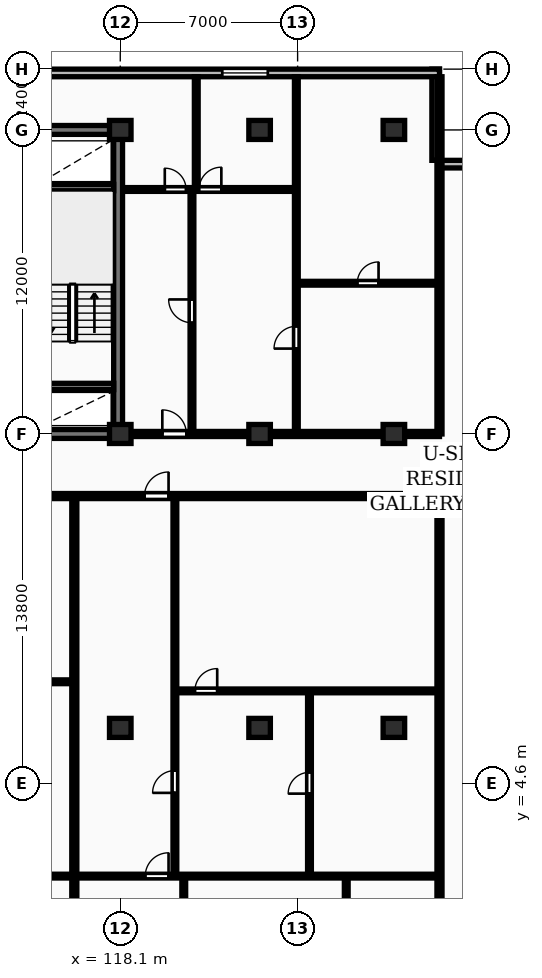
"""IFC4 building model, lengths in metres.
Left out: names, types, materials, properties, quantities, classifications, styles, units other than length and angle.
Written with IfcOpenShell. Run it as: python <this file> out.ifc"""

import sys

from ifc_helpers import new_model, si_unit, direction, frame, frame_2d, origin, origin_2d, place, context, subcontext, project, spatial, rectangle, extrude, element, fill, save


model = new_model("IFC4")
c1 = context("Model", 3, precision=1e-05, world=origin(), true_north=direction((0.0, 1.0)))
c2 = subcontext(c1, "Body", "Model", "MODEL_VIEW")
j1 = project(units=[si_unit("LENGTHUNIT", "METRE"), si_unit("PLANEANGLEUNIT", "RADIAN")], contexts=[c1])
p1 = place(None, origin())
s1 = spatial("IfcSite", under=j1, at=p1, CompositionType="ELEMENT")
p2 = place(p1, origin())
s2 = spatial("IfcBuilding", under=s1, at=p2, CompositionType="ELEMENT")
p3 = place(p2, frame((0.0, 0.0, 132.8)))
s3 = spatial("IfcBuildingStorey", under=s2, at=p3, CompositionType="ELEMENT", Elevation=132.8)
for number, where, z_axis, x_axis in (
    (1, (118.1, 6.8, 0.0), (0.0, 0.0, 1.0), (1.0, 0.0, 0.0)),
    (2, (118.1, 18.4, 0.0), (0.0, 0.0, 1.0), (1.0, 0.0, 0.0)),
    (3, (118.1, 30.4, 0.0), (0.0, 0.0, 1.0), (1.0, 0.0, 0.0)),
    (4, (123.6, 6.8, 0.0), (0.0, 0.0, 1.0), (1.0, 0.0, 0.0)),
    (5, (123.6, 18.4, 0.0), (0.0, 0.0, 1.0), (1.0, 0.0, 0.0)),
    (6, (123.6, 30.4, 0.0), (0.0, 0.0, 1.0), (1.0, 0.0, 0.0)),
    (7, (128.9, 6.8, 0.0), (0.0, 0.0, 1.0), (1.0, 0.0, 0.0)),
    (8, (128.9, 18.4, 0.0), (0.0, 0.0, 1.0), (1.0, 0.0, 0.0)),
    (9, (128.9, 30.4, 0.0), (0.0, 0.0, 1.0), (1.0, 0.0, 0.0)),
):
    element("IfcColumn", number, at=place(p3, frame(where, z_axis=z_axis, x_axis=x_axis)), inside=s3, PredefinedType="COLUMN", context=c2, shape_type="SweptSolid", body=[
        extrude(rectangle(XDim=0.85, YDim=0.75, at=origin_2d()), origin(), (0.0, 0.0, 1.0), 3.25),
    ])
for number, where, z_axis, x_axis in (
    (10, (134.3, 29.05, 0.0), (0.0, 0.0, 1.0), (-1.0, 0.0, 0.0)),
    (11, (130.55, 29.2, 0.0), (0.0, 0.0, 1.0), (0.0, 1.0, 0.0)),
):
    element("IfcWall", number, at=place(p3, frame(where, z_axis=z_axis, x_axis=x_axis)), inside=s3, PredefinedType="STANDARD", context=c2, shape_type="SweptSolid", body=[
        extrude(rectangle(XDim=3.6, YDim=0.3, at=frame_2d((1.8, 0.0))), origin(), (0.0, 0.0, 1.0), 2.97),
    ])
p4 = place(p3, frame((130.7, 32.65, 0.0), z_axis=(0.0, 0.0, 1.0), x_axis=(-1.0, 0.0, 0.0)))
e12 = element("IfcWall", 12, at=p4, inside=s3, PredefinedType="STANDARD", context=c2, shape_type="SweptSolid", body=[
    extrude(rectangle(XDim=58.0, YDim=0.3, at=frame_2d((29.0, 0.0))), origin(), (0.0, 0.0, 1.0), 2.97),
])
p5 = place(p4, frame((50.125, 0.0, 0.85)))
e13 = element("IfcOpeningElement", 13, at=p5, cuts=e12, PredefinedType="OPENING", context=c2, shape_type="SweptSolid", body=[
    extrude(rectangle(XDim=1.8, YDim=1.8, at=frame_2d((0.9, 0.9))), frame((0.0, 0.16, 0.0), z_axis=(0.0, -1.0, 0.0), x_axis=(1.0, 0.0, 0.0)), (0.0, 0.0, 1.0), 0.32),
])
p6 = place(p4, frame((6.775, 0.0, 0.85)))
e14 = element("IfcOpeningElement", 14, at=p6, cuts=e12, PredefinedType="OPENING", context=c2, shape_type="SweptSolid", body=[
    extrude(rectangle(XDim=1.8, YDim=1.8, at=frame_2d((0.9, 0.9))), frame((0.0, 0.16, 0.0), z_axis=(0.0, -1.0, 0.0), x_axis=(1.0, 0.0, 0.0)), (0.0, 0.0, 1.0), 0.32),
])
p7 = place(p3, frame((81.925, 30.4, 0.0), z_axis=(0.0, 0.0, 1.0), x_axis=(1.0, 0.0, 0.0)))
e15 = element("IfcWall", 15, at=p7, inside=s3, PredefinedType="SHEAR", context=c2, shape_type="SweptSolid", body=[
    extrude(rectangle(XDim=36.265, YDim=0.35, at=frame_2d((18.132, 0.0))), origin(), (0.0, 0.0, 1.0), 3.25),
])
p8 = place(p3, frame((118.015, 18.575, 0.0), z_axis=(0.0, 0.0, 1.0), x_axis=(0.0, 1.0, 0.0)))
e16 = element("IfcWall", 16, at=p8, inside=s3, PredefinedType="SHEAR", context=c2, shape_type="SweptSolid", body=[
    extrude(rectangle(XDim=11.65, YDim=0.35, at=frame_2d((5.825, 0.0))), origin(), (0.0, 0.0, 1.0), 3.25),
])
p9 = place(p3, frame((81.925, 18.4, 0.0), z_axis=(0.0, 0.0, 1.0), x_axis=(1.0, 0.0, 0.0)))
e17 = element("IfcWall", 17, at=p9, inside=s3, PredefinedType="SHEAR", context=c2, shape_type="SweptSolid", body=[
    extrude(rectangle(XDim=36.265, YDim=0.35, at=frame_2d((18.132, 0.0))), origin(), (0.0, 0.0, 1.0), 3.25),
])
p10 = place(p9, frame((5.675, 0.0, 0.0)))
e18 = element("IfcOpeningElement", 18, at=p10, cuts=e17, PredefinedType="OPENING", context=c2, shape_type="SweptSolid", body=[
    extrude(rectangle(XDim=1.0, YDim=2.15, at=frame_2d((0.5, 1.075))), frame((0.0, 0.185, 0.0), z_axis=(0.0, -1.0, 0.0), x_axis=(1.0, 0.0, 0.0)), (0.0, 0.0, 1.0), 0.37),
])
p11 = place(p9, frame((21.925, 0.0, 0.0)))
e19 = element("IfcOpeningElement", 19, at=p11, cuts=e17, PredefinedType="OPENING", context=c2, shape_type="SweptSolid", body=[
    extrude(rectangle(XDim=1.5, YDim=2.2, at=frame_2d((0.75, 1.1))), frame((0.0, 0.185, 0.0), z_axis=(0.0, -1.0, 0.0), x_axis=(1.0, 0.0, 0.0)), (0.0, 0.0, 1.0), 0.37),
])
p12 = place(p9, frame((29.875, 0.0, 0.0)))
e20 = element("IfcOpeningElement", 20, at=p12, cuts=e17, PredefinedType="OPENING", context=c2, shape_type="SweptSolid", body=[
    extrude(rectangle(XDim=1.0, YDim=2.15, at=frame_2d((0.5, 1.075))), frame((0.0, 0.185, 0.0), z_axis=(0.0, -1.0, 0.0), x_axis=(1.0, 0.0, 0.0)), (0.0, 0.0, 1.0), 0.37),
])
for number, where, z_axis, x_axis in (
    (21, (114.6, 20.275, 0.0), (0.0, 0.0, 1.0), (1.0, 0.0, 0.0)),
    (22, (114.6, 28.125, 0.0), (0.0, 0.0, 1.0), (1.0, 0.0, 0.0)),
):
    element("IfcWall", number, at=place(p3, frame(where, z_axis=z_axis, x_axis=x_axis)), inside=s3, PredefinedType="SHEAR", context=c2, shape_type="SweptSolid", body=[
        extrude(rectangle(XDim=3.24, YDim=0.25, at=frame_2d((1.62, 0.0))), origin(), (0.0, 0.0, 1.0), 3.25),
    ])
p13 = place(p3, frame((130.7, 18.4, 0.0), z_axis=(0.0, 0.0, 1.0), x_axis=(0.0, 1.0, 0.0)))
e23 = element("IfcWall", 23, at=p13, inside=s3, PredefinedType="PARTITIONING", context=c2, shape_type="SweptSolid", body=[
    extrude(rectangle(XDim=14.1, YDim=0.2, at=frame_2d((7.05, 0.0))), origin(), (0.0, 0.0, 1.0), 2.97),
])
p14 = place(p3, frame((125.05, 24.35, 0.0), z_axis=(0.0, 0.0, 1.0), x_axis=(1.0, 0.0, 0.0)))
e24 = element("IfcWall", 24, at=p14, inside=s3, PredefinedType="PARTITIONING", context=c2, shape_type="SweptSolid", body=[
    extrude(rectangle(XDim=5.65, YDim=0.15, at=frame_2d((2.825, 0.0))), origin(), (0.0, 0.0, 1.0), 2.97),
])
p15 = place(p14, frame((2.405, 0.0, 0.0)))
e25 = element("IfcOpeningElement", 25, at=p15, cuts=e24, PredefinedType="OPENING", context=c2, shape_type="SweptSolid", body=[
    extrude(rectangle(XDim=0.84, YDim=2.04, at=frame_2d((0.42, 1.02))), frame((0.0, 0.085, 0.0), z_axis=(0.0, -1.0, 0.0), x_axis=(1.0, 0.0, 0.0)), (0.0, 0.0, 1.0), 0.17),
])
p16 = place(p3, frame((125.05, 18.45, 0.0), z_axis=(0.0, 0.0, 1.0), x_axis=(0.0, 1.0, 0.0)))
e26 = element("IfcWall", 26, at=p16, inside=s3, PredefinedType="PARTITIONING", context=c2, shape_type="SweptSolid", body=[
    extrude(rectangle(XDim=14.05, YDim=0.15, at=frame_2d((7.025, 0.0))), origin(), (0.0, 0.0, 1.0), 2.97),
])
p17 = place(p16, frame((3.32, 0.0, 0.0)))
e27 = element("IfcOpeningElement", 27, at=p17, cuts=e26, PredefinedType="OPENING", context=c2, shape_type="SweptSolid", body=[
    extrude(rectangle(XDim=0.88, YDim=2.06, at=frame_2d((0.44, 1.03))), frame((0.0, 0.085, 0.0), z_axis=(0.0, -1.0, 0.0), x_axis=(1.0, 0.0, 0.0)), (0.0, 0.0, 1.0), 0.17),
])
p18 = place(p3, frame((120.93, 18.45, 0.0), z_axis=(0.0, 0.0, 1.0), x_axis=(0.0, 1.0, 0.0)))
e28 = element("IfcWall", 28, at=p18, inside=s3, PredefinedType="PARTITIONING", context=c2, shape_type="SweptSolid", body=[
    extrude(rectangle(XDim=9.6, YDim=0.15, at=frame_2d((4.8, 0.0))), origin(), (0.0, 0.0, 1.0), 2.97),
])
p19 = place(p18, frame((4.34, 0.0, 0.0)))
e29 = element("IfcOpeningElement", 29, at=p19, cuts=e28, PredefinedType="OPENING", context=c2, shape_type="SweptSolid", body=[
    extrude(rectangle(XDim=0.92, YDim=2.08, at=frame_2d((0.46, 1.04))), frame((0.0, 0.085, 0.0), z_axis=(0.0, -1.0, 0.0), x_axis=(1.0, 0.0, 0.0)), (0.0, 0.0, 1.0), 0.17),
])
p20 = place(p3, frame((121.1, 28.05, 0.0), z_axis=(0.0, 0.0, 1.0), x_axis=(0.0, 1.0, 0.0)))
e30 = element("IfcWall", 30, at=p20, inside=s3, PredefinedType="PARTITIONING", context=c2, shape_type="SweptSolid", body=[
    extrude(rectangle(XDim=4.45, YDim=0.15, at=frame_2d((2.225, 0.0))), origin(), (0.0, 0.0, 1.0), 2.97),
])
p21 = place(p3, frame((118.27, 28.05, 0.0), z_axis=(0.0, 0.0, 1.0), x_axis=(1.0, 0.0, 0.0)))
e31 = element("IfcWall", 31, at=p21, inside=s3, PredefinedType="PARTITIONING", context=c2, shape_type="SweptSolid", body=[
    extrude(rectangle(XDim=6.76, YDim=0.15, at=frame_2d((3.38, 0.0))), origin(), (0.0, 0.0, 1.0), 2.97),
])
p22 = place(p21, frame((1.587, 0.0, 0.0)))
e32 = element("IfcOpeningElement", 32, at=p22, cuts=e31, PredefinedType="OPENING", context=c2, shape_type="SweptSolid", body=[
    extrude(rectangle(XDim=0.84, YDim=2.04, at=frame_2d((0.42, 1.02))), frame((0.0, 0.085, 0.0), z_axis=(0.0, -1.0, 0.0), x_axis=(1.0, 0.0, 0.0)), (0.0, 0.0, 1.0), 0.17),
])
p23 = place(p21, frame((2.94, 0.0, 0.0)))
e33 = element("IfcOpeningElement", 33, at=p23, cuts=e31, PredefinedType="OPENING", context=c2, shape_type="SweptSolid", body=[
    extrude(rectangle(XDim=0.88, YDim=2.06, at=frame_2d((0.44, 1.03))), frame((0.0, 0.085, 0.0), z_axis=(0.0, -1.0, 0.0), x_axis=(1.0, 0.0, 0.0)), (0.0, 0.0, 1.0), 0.17),
])
p24 = place(p3, frame((118.25, 18.4, 0.0), z_axis=(0.0, 0.0, 1.0), x_axis=(1.0, 0.0, 0.0)))
e34 = element("IfcWall", 34, at=p24, inside=s3, PredefinedType="PARTITIONING", context=c2, shape_type="SweptSolid", body=[
    extrude(rectangle(XDim=12.45, YDim=0.2, at=frame_2d((6.225, 0.0))), origin(), (0.0, 0.0, 1.0), 2.358),
])
p25 = place(p24, frame((1.51, 0.0, 0.0)))
e35 = element("IfcOpeningElement", 35, at=p25, cuts=e34, PredefinedType="OPENING", context=c2, shape_type="SweptSolid", body=[
    extrude(rectangle(XDim=0.95, YDim=2.15, at=frame_2d((0.475, 1.075))), frame((0.0, 0.11, 0.0), z_axis=(0.0, -1.0, 0.0), x_axis=(1.0, 0.0, 0.0)), (0.0, 0.0, 1.0), 0.22),
])
for number, where, z_axis, x_axis in (
    (36, (130.7, -8.7, 0.0), (0.0, 0.0, 1.0), (0.0, 1.0, 0.0)),
    (37, (116.286, -8.7, 0.0), (0.0, 0.0, 1.0), (0.0, 1.0, 0.0)),
):
    element("IfcWall", number, at=place(p3, frame(where, z_axis=z_axis, x_axis=x_axis)), inside=s3, PredefinedType="PARTITIONING", context=c2, shape_type="SweptSolid", body=[
        extrude(rectangle(XDim=24.57, YDim=0.2, at=frame_2d((12.285, 0.0))), origin(), (0.0, 0.0, 1.0), 2.97),
    ])
p26 = place(p3, frame((101.685, 8.62, 0.0), z_axis=(0.0, 0.0, 1.0), x_axis=(1.0, 0.0, 0.0)))
e38 = element("IfcWall", 38, at=p26, inside=s3, PredefinedType="PARTITIONING", context=c2, shape_type="SweptSolid", body=[
    extrude(rectangle(XDim=14.522, YDim=0.15, at=frame_2d((7.261, 0.0))), origin(), (0.0, 0.0, 1.0), 2.97),
])
p27 = place(p26, frame((4.903, 0.0, 0.0)))
e39 = element("IfcOpeningElement", 39, at=p27, cuts=e38, PredefinedType="OPENING", context=c2, shape_type="SweptSolid", body=[
    extrude(rectangle(XDim=0.88, YDim=2.06, at=frame_2d((0.44, 1.03))), frame((0.0, 0.085, 0.0), z_axis=(0.0, -1.0, 0.0), x_axis=(1.0, 0.0, 0.0)), (0.0, 0.0, 1.0), 0.17),
])
p28 = place(p3, frame((97.735, 0.95, 0.0), z_axis=(0.0, 0.0, 1.0), x_axis=(1.0, 0.0, 0.0)))
e40 = element("IfcWall", 40, at=p28, inside=s3, PredefinedType="PARTITIONING", context=c2, shape_type="SweptSolid", body=[
    extrude(rectangle(XDim=18.472, YDim=0.15, at=frame_2d((9.236, 0.0))), origin(), (0.0, 0.0, 1.0), 2.97),
])
p29 = place(p28, frame((2.72, 0.0, 0.0)))
e41 = element("IfcOpeningElement", 41, at=p29, cuts=e40, PredefinedType="OPENING", context=c2, shape_type="SweptSolid", body=[
    extrude(rectangle(XDim=0.92, YDim=2.08, at=frame_2d((0.46, 1.04))), frame((0.0, 0.085, 0.0), z_axis=(0.0, -1.0, 0.0), x_axis=(1.0, 0.0, 0.0)), (0.0, 0.0, 1.0), 0.17),
])
p30 = place(p3, frame((125.568, 0.99, 0.0), z_axis=(0.0, 0.0, 1.0), x_axis=(0.0, 1.0, 0.0)))
e42 = element("IfcWall", 42, at=p30, inside=s3, PredefinedType="PARTITIONING", context=c2, shape_type="SweptSolid", body=[
    extrude(rectangle(XDim=7.27, YDim=0.15, at=frame_2d((3.635, 0.0))), origin(), (0.0, 0.0, 1.0), 2.97),
])
p31 = place(p30, frame((3.215, 0.0, 0.0)))
e43 = element("IfcOpeningElement", 43, at=p31, cuts=e42, PredefinedType="OPENING", context=c2, shape_type="SweptSolid", body=[
    extrude(rectangle(XDim=0.84, YDim=2.04, at=frame_2d((0.42, 1.02))), frame((0.0, 0.085, 0.0), z_axis=(0.0, -1.0, 0.0), x_axis=(1.0, 0.0, 0.0)), (0.0, 0.0, 1.0), 0.17),
])
p32 = place(p3, frame((120.316, 8.26, 0.0), z_axis=(0.0, 0.0, 1.0), x_axis=(1.0, 0.0, 0.0)))
e44 = element("IfcWall", 44, at=p32, inside=s3, PredefinedType="PARTITIONING", context=c2, shape_type="SweptSolid", body=[
    extrude(rectangle(XDim=10.304, YDim=0.15, at=frame_2d((5.152, 0.0))), origin(), (0.0, 0.0, 1.0), 2.97),
])
p33 = place(p32, frame((0.73, 0.0, 0.0)))
e45 = element("IfcOpeningElement", 45, at=p33, cuts=e44, PredefinedType="OPENING", context=c2, shape_type="SweptSolid", body=[
    extrude(rectangle(XDim=0.88, YDim=2.06, at=frame_2d((0.44, 1.03))), frame((0.0, 0.085, 0.0), z_axis=(0.0, -1.0, 0.0), x_axis=(1.0, 0.0, 0.0)), (0.0, 0.0, 1.0), 0.17),
])
p34 = place(p3, frame((120.256, 0.99, 0.0), z_axis=(0.0, 0.0, 1.0), x_axis=(0.0, 1.0, 0.0)))
e46 = element("IfcWall", 46, at=p34, inside=s3, PredefinedType="PARTITIONING", context=c2, shape_type="SweptSolid", body=[
    extrude(rectangle(XDim=14.9, YDim=0.15, at=frame_2d((7.45, 0.0))), origin(), (0.0, 0.0, 1.0), 2.97),
])
p35 = place(p34, frame((3.245, 0.0, 0.0)))
e47 = element("IfcOpeningElement", 47, at=p35, cuts=e46, PredefinedType="OPENING", context=c2, shape_type="SweptSolid", body=[
    extrude(rectangle(XDim=0.88, YDim=2.06, at=frame_2d((0.44, 1.03))), frame((0.0, 0.085, 0.0), z_axis=(0.0, -1.0, 0.0), x_axis=(1.0, 0.0, 0.0)), (0.0, 0.0, 1.0), 0.17),
])
p36 = place(p3, frame((120.606, -4.09, 0.0), z_axis=(0.0, 0.0, 1.0), x_axis=(0.0, 1.0, 0.0)))
e48 = element("IfcWall", 48, at=p36, inside=s3, PredefinedType="PARTITIONING", context=c2, shape_type="SweptSolid", body=[
    extrude(rectangle(XDim=5.0, YDim=0.15, at=frame_2d((2.5, 0.0))), origin(), (0.0, 0.0, 1.0), 2.97),
])
p37 = place(p36, frame((2.06, 0.0, 0.0)))
e49 = element("IfcOpeningElement", 49, at=p37, cuts=e48, PredefinedType="OPENING", context=c2, shape_type="SweptSolid", body=[
    extrude(rectangle(XDim=0.88, YDim=2.06, at=frame_2d((0.44, 1.03))), frame((0.0, 0.085, 0.0), z_axis=(0.0, -1.0, 0.0), x_axis=(1.0, 0.0, 0.0)), (0.0, 0.0, 1.0), 0.17),
])
p38 = place(p3, frame((127.02, -8.7, 0.0), z_axis=(0.0, 0.0, 1.0), x_axis=(0.0, 1.0, 0.0)))
e50 = element("IfcWall", 50, at=p38, inside=s3, PredefinedType="PARTITIONING", context=c2, shape_type="SweptSolid", body=[
    extrude(rectangle(XDim=9.61, YDim=0.15, at=frame_2d((4.805, 0.0))), origin(), (0.0, 0.0, 1.0), 2.97),
])
p39 = place(p38, frame((6.065, 0.0, 0.0)))
e51 = element("IfcOpeningElement", 51, at=p39, cuts=e50, PredefinedType="OPENING", context=c2, shape_type="SweptSolid", body=[
    extrude(rectangle(XDim=0.84, YDim=2.04, at=frame_2d((0.42, 1.02))), frame((0.0, 0.085, 0.0), z_axis=(0.0, -1.0, 0.0), x_axis=(1.0, 0.0, 0.0)), (0.0, 0.0, 1.0), 0.17),
])
p40 = place(p38, frame((7.34, 0.0, 0.0)))
e52 = element("IfcOpeningElement", 52, at=p40, cuts=e50, PredefinedType="OPENING", context=c2, shape_type="SweptSolid", body=[
    extrude(rectangle(XDim=0.84, YDim=2.04, at=frame_2d((0.42, 1.02))), frame((0.0, 0.085, 0.0), z_axis=(0.0, -1.0, 0.0), x_axis=(1.0, 0.0, 0.0)), (0.0, 0.0, 1.0), 0.17),
])
p41 = place(p38, frame((1.971, 0.0, 0.0)))
e53 = element("IfcOpeningElement", 53, at=p41, cuts=e50, PredefinedType="OPENING", context=c2, shape_type="SweptSolid", body=[
    extrude(rectangle(XDim=0.88, YDim=2.06, at=frame_2d((0.44, 1.03))), frame((0.0, 0.085, 0.0), z_axis=(0.0, -1.0, 0.0), x_axis=(1.0, 0.0, 0.0)), (0.0, 0.0, 1.0), 0.17),
])
p42 = place(p3, frame((116.366, 0.95, 0.0), z_axis=(0.0, 0.0, 1.0), x_axis=(1.0, 0.0, 0.0)))
e54 = element("IfcWall", 54, at=p42, inside=s3, PredefinedType="PARTITIONING", context=c2, shape_type="SweptSolid", body=[
    extrude(rectangle(XDim=14.254, YDim=0.15, at=frame_2d((7.127, 0.0))), origin(), (0.0, 0.0, 1.0), 2.97),
])
p43 = place(p42, frame((2.72, 0.0, 0.0)))
e55 = element("IfcOpeningElement", 55, at=p43, cuts=e54, PredefinedType="OPENING", context=c2, shape_type="SweptSolid", body=[
    extrude(rectangle(XDim=0.92, YDim=2.08, at=frame_2d((0.46, 1.04))), frame((0.0, 0.085, 0.0), z_axis=(0.0, -1.0, 0.0), x_axis=(1.0, 0.0, 0.0)), (0.0, 0.0, 1.0), 0.17),
])
p44 = place(p3, frame((72.7, 15.95, 0.0), z_axis=(0.0, 0.0, 1.0), x_axis=(1.0, 0.0, 0.0)))
e56 = element("IfcWall", 56, at=p44, inside=s3, PredefinedType="PARTITIONING", context=c2, shape_type="SweptSolid", body=[
    extrude(rectangle(XDim=58.0, YDim=0.2, at=frame_2d((29.0, 0.0))), origin(), (0.0, 0.0, 1.0), 2.97),
])
p45 = place(p44, frame((2.77, 0.0, 0.0)))
e57 = element("IfcOpeningElement", 57, at=p45, cuts=e56, PredefinedType="OPENING", context=c2, shape_type="SweptSolid", body=[
    extrude(rectangle(XDim=0.95, YDim=2.15, at=frame_2d((0.475, 1.075))), frame((0.0, 0.11, 0.0), z_axis=(0.0, -1.0, 0.0), x_axis=(1.0, 0.0, 0.0)), (0.0, 0.0, 1.0), 0.22),
])
p46 = place(p44, frame((25.324, 0.0, 0.0)))
e58 = element("IfcOpeningElement", 58, at=p46, cuts=e56, PredefinedType="OPENING", context=c2, shape_type="SweptSolid", body=[
    extrude(rectangle(XDim=0.95, YDim=2.15, at=frame_2d((0.475, 1.075))), frame((0.0, 0.11, 0.0), z_axis=(0.0, -1.0, 0.0), x_axis=(1.0, 0.0, 0.0)), (0.0, 0.0, 1.0), 0.22),
])
p47 = place(p44, frame((46.356, 0.0, 0.0)))
e59 = element("IfcOpeningElement", 59, at=p47, cuts=e56, PredefinedType="OPENING", context=c2, shape_type="SweptSolid", body=[
    extrude(rectangle(XDim=0.95, YDim=2.15, at=frame_2d((0.475, 1.075))), frame((0.0, 0.11, 0.0), z_axis=(0.0, -1.0, 0.0), x_axis=(1.0, 0.0, 0.0)), (0.0, 0.0, 1.0), 0.22),
])
p48 = place(p6, origin())
e60 = element("IfcWindow", 60, at=p48, inside=s3, PartitioningType="SINGLE_PANEL", PredefinedType="WINDOW", context=c2, shape_type="SweptSolid", body=[
    extrude(rectangle(XDim=1.8, YDim=1.8, at=frame_2d((0.9, 0.9))), frame((0.0, 0.03, 0.0), z_axis=(0.0, -1.0, 0.0), x_axis=(1.0, 0.0, 0.0)), (0.0, 0.0, 1.0), 0.06),
])
fill(e14, e60)
p49 = place(p15, origin())
e61 = element("IfcDoor", 61, at=p49, inside=s3, OperationType="SINGLE_SWING_RIGHT", PredefinedType="DOOR", context=c2, shape_type="SweptSolid", body=[
    extrude(rectangle(XDim=0.84, YDim=2.04, at=frame_2d((0.42, 1.02))), frame((0.0, 0.025, 0.0), z_axis=(0.0, -1.0, 0.0), x_axis=(1.0, 0.0, 0.0)), (0.0, 0.0, 1.0), 0.05),
])
fill(e25, e61)
p50 = place(p17, origin())
e62 = element("IfcDoor", 62, at=p50, inside=s3, OperationType="SINGLE_SWING_LEFT", PredefinedType="DOOR", context=c2, shape_type="SweptSolid", body=[
    extrude(rectangle(XDim=0.88, YDim=2.06, at=frame_2d((0.44, 1.03))), frame((0.0, 0.025, 0.0), z_axis=(0.0, -1.0, 0.0), x_axis=(1.0, 0.0, 0.0)), (0.0, 0.0, 1.0), 0.05),
])
fill(e27, e62)
p51 = place(p19, origin())
e63 = element("IfcDoor", 63, at=p51, inside=s3, OperationType="SINGLE_SWING_RIGHT", PredefinedType="DOOR", context=c2, shape_type="SweptSolid", body=[
    extrude(rectangle(XDim=0.92, YDim=2.08, at=frame_2d((0.46, 1.04))), frame((0.0, 0.025, 0.0), z_axis=(0.0, -1.0, 0.0), x_axis=(1.0, 0.0, 0.0)), (0.0, 0.0, 1.0), 0.05),
])
fill(e29, e63)
p52 = place(p22, origin())
e64 = element("IfcDoor", 64, at=p52, inside=s3, OperationType="SINGLE_SWING_LEFT", PredefinedType="DOOR", context=c2, shape_type="SweptSolid", body=[
    extrude(rectangle(XDim=0.84, YDim=2.04, at=frame_2d((0.42, 1.02))), frame((0.0, 0.025, 0.0), z_axis=(0.0, -1.0, 0.0), x_axis=(1.0, 0.0, 0.0)), (0.0, 0.0, 1.0), 0.05),
])
fill(e32, e64)
p53 = place(p23, origin())
e65 = element("IfcDoor", 65, at=p53, inside=s3, OperationType="SINGLE_SWING_RIGHT", PredefinedType="DOOR", context=c2, shape_type="SweptSolid", body=[
    extrude(rectangle(XDim=0.88, YDim=2.06, at=frame_2d((0.44, 1.03))), frame((0.0, 0.025, 0.0), z_axis=(0.0, -1.0, 0.0), x_axis=(1.0, 0.0, 0.0)), (0.0, 0.0, 1.0), 0.05),
])
fill(e33, e65)
p54 = place(p25, origin())
e66 = element("IfcDoor", 66, at=p54, inside=s3, OperationType="SINGLE_SWING_LEFT", PredefinedType="DOOR", context=c2, shape_type="SweptSolid", body=[
    extrude(rectangle(XDim=0.95, YDim=2.15, at=frame_2d((0.475, 1.075))), frame((0.0, 0.025, 0.0), z_axis=(0.0, -1.0, 0.0), x_axis=(1.0, 0.0, 0.0)), (0.0, 0.0, 1.0), 0.05),
])
fill(e35, e66)
p55 = place(p31, origin())
e67 = element("IfcDoor", 67, at=p55, inside=s3, OperationType="SINGLE_SWING_LEFT", PredefinedType="DOOR", context=c2, shape_type="SweptSolid", body=[
    extrude(rectangle(XDim=0.84, YDim=2.04, at=frame_2d((0.42, 1.02))), frame((0.0, 0.025, 0.0), z_axis=(0.0, -1.0, 0.0), x_axis=(1.0, 0.0, 0.0)), (0.0, 0.0, 1.0), 0.05),
])
fill(e43, e67)
p56 = place(p33, origin())
e68 = element("IfcDoor", 68, at=p56, inside=s3, OperationType="SINGLE_SWING_RIGHT", PredefinedType="DOOR", context=c2, shape_type="SweptSolid", body=[
    extrude(rectangle(XDim=0.88, YDim=2.06, at=frame_2d((0.44, 1.03))), frame((0.0, 0.025, 0.0), z_axis=(0.0, -1.0, 0.0), x_axis=(1.0, 0.0, 0.0)), (0.0, 0.0, 1.0), 0.05),
])
fill(e45, e68)
p57 = place(p35, origin())
e69 = element("IfcDoor", 69, at=p57, inside=s3, OperationType="SINGLE_SWING_LEFT", PredefinedType="DOOR", context=c2, shape_type="SweptSolid", body=[
    extrude(rectangle(XDim=0.88, YDim=2.06, at=frame_2d((0.44, 1.03))), frame((0.0, 0.025, 0.0), z_axis=(0.0, -1.0, 0.0), x_axis=(1.0, 0.0, 0.0)), (0.0, 0.0, 1.0), 0.05),
])
fill(e47, e69)
p58 = place(p43, origin())
e70 = element("IfcDoor", 70, at=p58, inside=s3, OperationType="SINGLE_SWING_RIGHT", PredefinedType="DOOR", context=c2, shape_type="SweptSolid", body=[
    extrude(rectangle(XDim=0.92, YDim=2.08, at=frame_2d((0.46, 1.04))), frame((0.0, 0.025, 0.0), z_axis=(0.0, -1.0, 0.0), x_axis=(1.0, 0.0, 0.0)), (0.0, 0.0, 1.0), 0.05),
])
fill(e55, e70)
p59 = place(p47, origin())
e71 = element("IfcDoor", 71, at=p59, inside=s3, OperationType="SINGLE_SWING_RIGHT", PredefinedType="DOOR", context=c2, shape_type="SweptSolid", body=[
    extrude(rectangle(XDim=0.95, YDim=2.15, at=frame_2d((0.475, 1.075))), frame((0.0, 0.025, 0.0), z_axis=(0.0, -1.0, 0.0), x_axis=(1.0, 0.0, 0.0)), (0.0, 0.0, 1.0), 0.05),
])
fill(e59, e71)
save(model, sys.argv[1])
